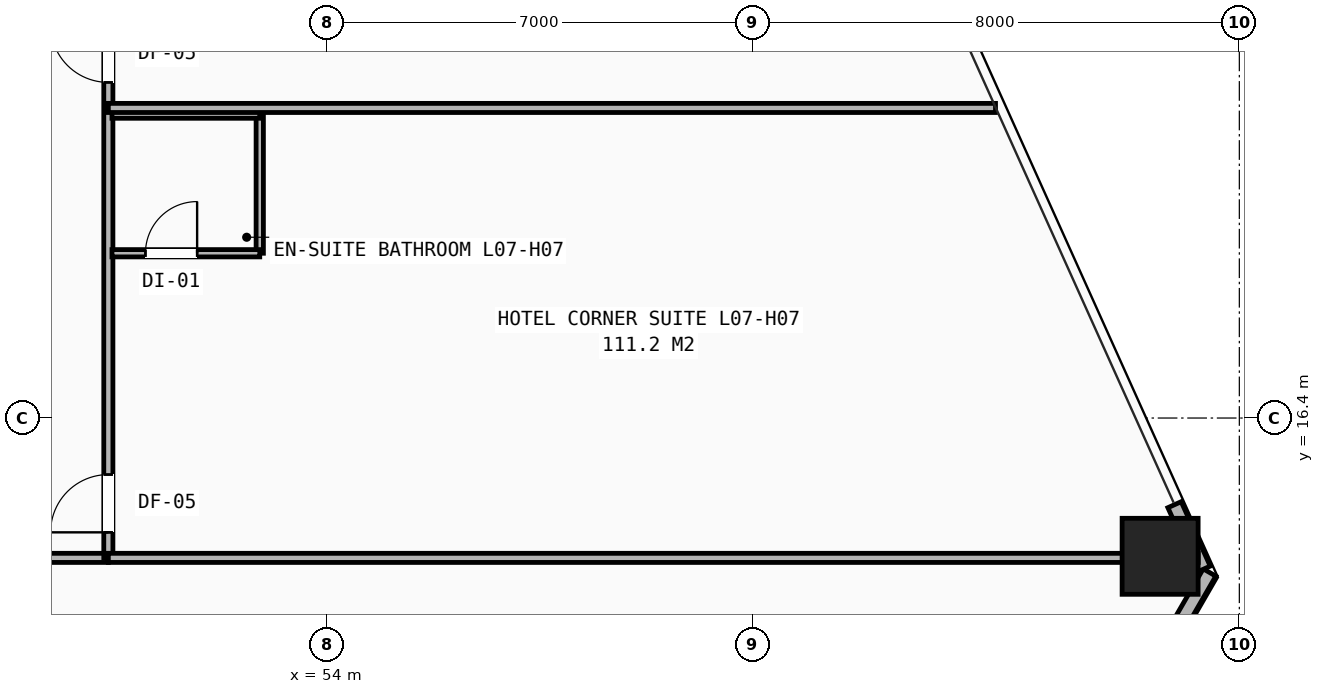
"""IFC4 building model, lengths in metres.
Left out: names, types, materials, properties, quantities, classifications, styles, units other than length and angle.
Written with IfcOpenShell. Run it as: python <this file> out.ifc"""

import sys

from ifc_helpers import new_model, si_unit, direction, frame, frame_2d, origin, origin_2d, place, context, subcontext, project, spatial, rectangle, hollow_rectangle, extrude, element, fill, save


model = new_model("IFC4")
c1 = context("Model", 3, precision=1e-05, world=origin(), true_north=direction((0.0, 1.0)))
c2 = subcontext(c1, "Body", "Model", "MODEL_VIEW")
j1 = project(units=[si_unit("LENGTHUNIT", "METRE"), si_unit("PLANEANGLEUNIT", "RADIAN")], contexts=[c1])
p1 = place(None, origin())
s1 = spatial("IfcSite", under=j1, at=p1, CompositionType="ELEMENT")
p2 = place(p1, origin())
s2 = spatial("IfcBuilding", under=s1, at=p2, CompositionType="ELEMENT")
p3 = place(p2, frame((0.0, 0.0, 30.4)))
s3 = spatial("IfcBuildingStorey", under=s2, at=p3, CompositionType="ELEMENT", Elevation=30.4)
p4 = place(p3, frame((67.697, 14.126, 0.0), z_axis=(0.0, 0.0, 1.0), x_axis=(1.0, 0.0, 0.0)))
e1 = element("IfcColumn", 1, at=p4, inside=s3, PredefinedType="COLUMN", context=c2, shape_type="SweptSolid", body=[
    extrude(hollow_rectangle(XDim=1.25, YDim=1.25, WallThickness=0.08, at=origin_2d()), origin(), (0.0, 0.0, 1.0), 3.2),
])
p5 = place(p3, frame((68.51, 13.86, 0.0), z_axis=(0.0, 0.0, 1.0), x_axis=(-0.49998363312, -0.866034853001, 0.0)))
e2 = element("IfcWall", 2, at=p5, inside=s3, PredefinedType="SHEAR", context=c2, shape_type="SweptSolid", body=[
    extrude(rectangle(XDim=10.6, YDim=0.24, at=frame_2d((5.3, 0.0))), origin(), (0.0, 0.0, 1.0), 2.263),
])
p6 = place(p3, frame((68.412, 13.915, 0.0), z_axis=(0.0, 0.0, 1.0), x_axis=(-0.410810004845, 0.91172097701, 0.0)))
e3 = element("IfcWall", 3, at=p6, inside=s3, PredefinedType="SHEAR", context=c2, shape_type="SweptSolid", body=[
    extrude(rectangle(XDim=1.162, YDim=0.24, at=frame_2d((0.581, 0.0))), origin(), (0.0, 0.0, 1.0), 2.263),
])
p7 = place(p3, frame((29.6, 14.1, 0.0), z_axis=(0.0, 0.0, 1.0), x_axis=(1.0, 0.0, 0.0)))
e4 = element("IfcWall", 4, at=p7, inside=s3, PredefinedType="PARTITIONING", context=c2, shape_type="SweptSolid", body=[
    extrude(rectangle(XDim=20.8, YDim=0.15, at=frame_2d((10.4, 0.0))), origin(), (0.0, 0.0, 1.0), 2.431),
])
p8 = place(p7, frame((0.57, 0.0, 0.0)))
e5 = element("IfcOpeningElement", 5, at=p8, cuts=e4, PredefinedType="OPENING", context=c2, shape_type="SweptSolid", body=[
    extrude(rectangle(XDim=0.95, YDim=2.1, at=frame_2d((0.475, 1.05))), frame((0.0, 0.085, 0.0), z_axis=(0.0, -1.0, 0.0), x_axis=(1.0, 0.0, 0.0)), (0.0, 0.0, 1.0), 0.17),
])
p9 = place(p7, frame((5.32, 0.0, 0.0)))
e6 = element("IfcOpeningElement", 6, at=p9, cuts=e4, PredefinedType="OPENING", context=c2, shape_type="SweptSolid", body=[
    extrude(rectangle(XDim=0.95, YDim=2.1, at=frame_2d((0.475, 1.05))), frame((0.0, 0.085, 0.0), z_axis=(0.0, -1.0, 0.0), x_axis=(1.0, 0.0, 0.0)), (0.0, 0.0, 1.0), 0.17),
])
p10 = place(p7, frame((13.32, 0.0, 0.0)))
e7 = element("IfcOpeningElement", 7, at=p10, cuts=e4, PredefinedType="OPENING", context=c2, shape_type="SweptSolid", body=[
    extrude(rectangle(XDim=0.95, YDim=2.1, at=frame_2d((0.475, 1.05))), frame((0.0, 0.085, 0.0), z_axis=(0.0, -1.0, 0.0), x_axis=(1.0, 0.0, 0.0)), (0.0, 0.0, 1.0), 0.17),
])
p11 = place(p3, frame((50.4, 14.1, 0.0), z_axis=(0.0, 0.0, 1.0), x_axis=(0.0, 1.0, 0.0)))
e8 = element("IfcWall", 8, at=p11, inside=s3, PredefinedType="PARTITIONING", context=c2, shape_type="SweptSolid", body=[
    extrude(rectangle(XDim=21.9, YDim=0.15, at=frame_2d((10.95, 0.0))), origin(), (0.0, 0.0, 1.0), 2.431),
])
p12 = place(p11, frame((0.42, 0.0, 0.0)))
e9 = element("IfcOpeningElement", 9, at=p12, cuts=e8, PredefinedType="OPENING", context=c2, shape_type="SweptSolid", body=[
    extrude(rectangle(XDim=0.95, YDim=2.1, at=frame_2d((0.475, 1.05))), frame((0.0, 0.085, 0.0), z_axis=(0.0, -1.0, 0.0), x_axis=(1.0, 0.0, 0.0)), (0.0, 0.0, 1.0), 0.17),
])
p13 = place(p11, frame((7.82, 0.0, 0.0)))
e10 = element("IfcOpeningElement", 10, at=p13, cuts=e8, PredefinedType="OPENING", context=c2, shape_type="SweptSolid", body=[
    extrude(rectangle(XDim=0.95, YDim=2.1, at=frame_2d((0.475, 1.05))), frame((0.0, 0.085, 0.0), z_axis=(0.0, -1.0, 0.0), x_axis=(1.0, 0.0, 0.0)), (0.0, 0.0, 1.0), 0.17),
])
p14 = place(p11, frame((15.32, 0.0, 0.0)))
e11 = element("IfcOpeningElement", 11, at=p14, cuts=e8, PredefinedType="OPENING", context=c2, shape_type="SweptSolid", body=[
    extrude(rectangle(XDim=0.95, YDim=2.1, at=frame_2d((0.475, 1.05))), frame((0.0, 0.085, 0.0), z_axis=(0.0, -1.0, 0.0), x_axis=(1.0, 0.0, 0.0)), (0.0, 0.0, 1.0), 0.17),
])
p15 = place(p3, frame((50.4, 14.1, 0.0), z_axis=(0.0, 0.0, 1.0), x_axis=(1.0, 0.0, 0.0)))
e12 = element("IfcWall", 12, at=p15, inside=s3, PredefinedType="PARTITIONING", context=c2, shape_type="SweptSolid", body=[
    extrude(rectangle(XDim=17.923, YDim=0.15, at=frame_2d((8.961, 0.0))), origin(), (0.0, 0.0, 1.0), 2.268),
])
p16 = place(p3, frame((52.89, 19.11, 0.0), z_axis=(0.0, 0.0, 1.0), x_axis=(0.0, 1.0, 0.0)))
e13 = element("IfcWall", 13, at=p16, inside=s3, PredefinedType="PARTITIONING", context=c2, shape_type="SweptSolid", body=[
    extrude(rectangle(XDim=2.28, YDim=0.12, at=frame_2d((1.14, 0.0))), origin(), (0.0, 0.0, 1.0), 2.98),
])
p17 = place(p3, frame((50.46, 19.11, 0.0), z_axis=(0.0, 0.0, 1.0), x_axis=(1.0, 0.0, 0.0)))
e14 = element("IfcWall", 14, at=p17, inside=s3, PredefinedType="PARTITIONING", context=c2, shape_type="SweptSolid", body=[
    extrude(rectangle(XDim=2.43, YDim=0.12, at=frame_2d((1.215, 0.0))), origin(), (0.0, 0.0, 1.0), 2.98),
])
p18 = place(p17, frame((0.55, 0.0, 0.0)))
e15 = element("IfcOpeningElement", 15, at=p18, cuts=e14, PredefinedType="OPENING", context=c2, shape_type="SweptSolid", body=[
    extrude(rectangle(XDim=0.85, YDim=2.05, at=frame_2d((0.425, 1.025))), frame((0.0, 0.07, 0.0), z_axis=(0.0, -1.0, 0.0), x_axis=(1.0, 0.0, 0.0)), (0.0, 0.0, 1.0), 0.14),
])
p19 = place(p3, frame((50.46, 21.39, 0.0), z_axis=(0.0, 0.0, 1.0), x_axis=(1.0, 0.0, 0.0)))
e16 = element("IfcWall", 16, at=p19, inside=s3, PredefinedType="PARTITIONING", context=c2, shape_type="SweptSolid", body=[
    extrude(rectangle(XDim=2.43, YDim=0.12, at=frame_2d((1.215, 0.0))), origin(), (0.0, 0.0, 1.0), 2.98),
])
p20 = place(p3, frame((50.4, 21.5, 0.0), z_axis=(0.0, 0.0, 1.0), x_axis=(1.0, 0.0, 0.0)))
e17 = element("IfcWall", 17, at=p20, inside=s3, PredefinedType="PARTITIONING", context=c2, shape_type="SweptSolid", body=[
    extrude(rectangle(XDim=14.59, YDim=0.15, at=frame_2d((7.295, 0.0))), origin(), (0.0, 0.0, 1.0), 2.268),
])
p21 = place(p12, origin())
e18 = element("IfcDoor", 18, at=p21, inside=s3, OperationType="SINGLE_SWING_LEFT", PredefinedType="DOOR", context=c2, shape_type="SweptSolid", body=[
    extrude(rectangle(XDim=0.95, YDim=2.1, at=frame_2d((0.475, 1.05))), frame((0.0, 0.025, 0.0), z_axis=(0.0, -1.0, 0.0), x_axis=(1.0, 0.0, 0.0)), (0.0, 0.0, 1.0), 0.05),
])
fill(e9, e18)
p22 = place(p18, origin())
e19 = element("IfcDoor", 19, at=p22, inside=s3, OperationType="SINGLE_SWING_RIGHT", PredefinedType="DOOR", context=c2, shape_type="SweptSolid", body=[
    extrude(rectangle(XDim=0.85, YDim=2.05, at=frame_2d((0.425, 1.025))), frame((0.0, 0.025, 0.0), z_axis=(0.0, -1.0, 0.0), x_axis=(1.0, 0.0, 0.0)), (0.0, 0.0, 1.0), 0.05),
])
fill(e15, e19)
p23 = place(p13, origin())
e20 = element("IfcDoor", 20, at=p23, inside=s3, OperationType="SINGLE_SWING_RIGHT", PredefinedType="DOOR", context=c2, shape_type="SweptSolid", body=[
    extrude(rectangle(XDim=0.95, YDim=2.1, at=frame_2d((0.475, 1.05))), frame((0.0, 0.025, 0.0), z_axis=(0.0, -1.0, 0.0), x_axis=(1.0, 0.0, 0.0)), (0.0, 0.0, 1.0), 0.05),
])
fill(e10, e20)
save(model, sys.argv[1])
